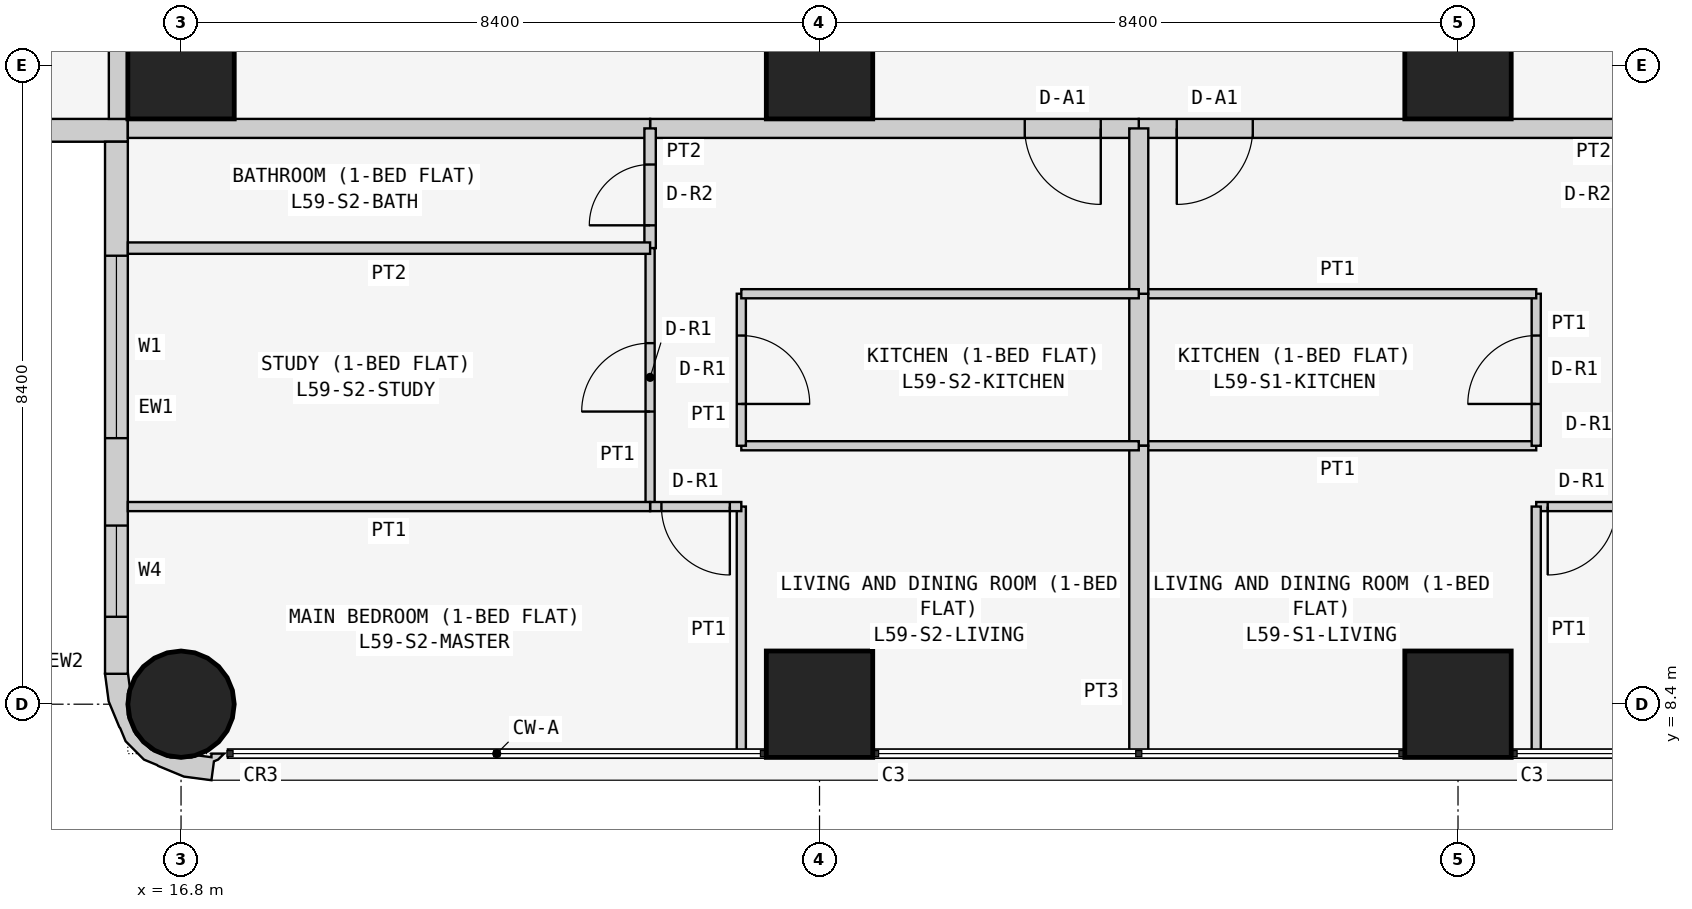
"""IFC4 building model, lengths in metres.
Left out: names, types, materials, properties, quantities, classifications, styles, units other than length and angle.
Written with IfcOpenShell. Run it as: python <this file> out.ifc"""

import sys

from ifc_helpers import new_model, si_unit, direction, frame, frame_2d, origin, origin_2d, place, context, subcontext, project, spatial, polyline, rectangle, circle, outline, extrude, element, fill, save


model = new_model("IFC4")
c1 = context("Model", 3, precision=1e-05, world=origin(), true_north=direction((0.0, 1.0)))
c2 = subcontext(c1, "Body", "Model", "MODEL_VIEW")
j1 = project(units=[si_unit("LENGTHUNIT", "METRE"), si_unit("PLANEANGLEUNIT", "RADIAN")], contexts=[c1])
p1 = place(None, origin())
s1 = spatial("IfcSite", under=j1, at=p1, CompositionType="ELEMENT")
p2 = place(p1, origin())
s2 = spatial("IfcBuilding", under=s1, at=p2, CompositionType="ELEMENT")
p3 = place(p2, frame((0.0, 0.0, 226.5)))
s3 = spatial("IfcBuildingStorey", under=s2, at=p3, CompositionType="ELEMENT", Elevation=226.5)
p4 = place(p3, frame((16.8, 8.4, 0.0), z_axis=(0.0, 0.0, 1.0), x_axis=(1.0, 0.0, 0.0)))
e1 = element("IfcColumn", 1, at=p4, inside=s3, PredefinedType="COLUMN", context=c2, shape_type="SweptSolid", body=[
    extrude(circle(Radius=0.7, at=origin_2d()), origin(), (0.0, 0.0, 1.0), 3.6),
])
for number, where, z_axis, x_axis in (
    (2, (16.8, 16.8, 0.0), (0.0, 0.0, 1.0), (1.0, 0.0, 0.0)),
    (3, (25.2, 8.4, 0.0), (0.0, 0.0, 1.0), (1.0, 0.0, 0.0)),
    (4, (25.2, 16.8, 0.0), (0.0, 0.0, 1.0), (1.0, 0.0, 0.0)),
    (5, (33.6, 8.4, 0.0), (0.0, 0.0, 1.0), (1.0, 0.0, 0.0)),
    (6, (33.6, 16.8, 0.0), (0.0, 0.0, 1.0), (1.0, 0.0, 0.0)),
):
    element("IfcColumn", number, at=place(p3, frame(where, z_axis=z_axis, x_axis=x_axis)), inside=s3, PredefinedType="COLUMN", context=c2, shape_type="SweptSolid", body=[
        extrude(rectangle(XDim=1.4, YDim=1.4, at=origin_2d()), origin(), (0.0, 0.0, 1.0), 3.6),
    ])
p5 = place(p3, frame((0.4, 15.95, 0.0), z_axis=(0.0, 0.0, 1.0), x_axis=(1.0, 0.0, 0.0)))
e7 = element("IfcWall", 7, at=p5, inside=s3, PredefinedType="SOLIDWALL", context=c2, shape_type="SweptSolid", body=[
    extrude(rectangle(XDim=15.7, YDim=0.3, at=frame_2d((7.85, 0.0))), origin(), (0.0, 0.0, 1.0), 3.45),
])
p6 = place(p5, frame((12.4, 0.0, 0.9)))
e8 = element("IfcOpeningElement", 8, at=p6, cuts=e7, PredefinedType="OPENING", context=c2, shape_type="SweptSolid", body=[
    extrude(rectangle(XDim=1.8, YDim=1.5, at=frame_2d((0.9, 0.75))), frame((0.0, 0.16, 0.0), z_axis=(0.0, -1.0, 0.0), x_axis=(1.0, 0.0, 0.0)), (0.0, 0.0, 1.0), 0.32),
])
p7 = place(p5, frame((9.55, 0.0, 1.5)))
e9 = element("IfcOpeningElement", 9, at=p7, cuts=e7, PredefinedType="OPENING", context=c2, shape_type="SweptSolid", body=[
    extrude(rectangle(XDim=0.9, YDim=0.7, at=frame_2d((0.45, 0.35))), frame((0.0, 0.16, 0.0), z_axis=(0.0, -1.0, 0.0), x_axis=(1.0, 0.0, 0.0)), (0.0, 0.0, 1.0), 0.32),
])
p8 = place(p5, frame((5.1, 0.0, 0.9)))
e10 = element("IfcOpeningElement", 10, at=p8, cuts=e7, PredefinedType="OPENING", context=c2, shape_type="SweptSolid", body=[
    extrude(rectangle(XDim=1.8, YDim=1.5, at=frame_2d((0.9, 0.75))), frame((0.0, 0.16, 0.0), z_axis=(0.0, -1.0, 0.0), x_axis=(1.0, 0.0, 0.0)), (0.0, 0.0, 1.0), 0.32),
])
p9 = place(p5, frame((2.0, 0.0, 0.0)))
e11 = element("IfcOpeningElement", 11, at=p9, cuts=e7, PredefinedType="OPENING", context=c2, shape_type="SweptSolid", body=[
    extrude(rectangle(XDim=0.9, YDim=2.4, at=frame_2d((0.45, 1.2))), frame((0.0, 0.16, 0.0), z_axis=(0.0, -1.0, 0.0), x_axis=(1.0, 0.0, 0.0)), (0.0, 0.0, 1.0), 0.32),
])
p10 = place(p5, frame((0.7, 0.0, 0.9)))
e12 = element("IfcOpeningElement", 12, at=p10, cuts=e7, PredefinedType="OPENING", context=c2, shape_type="SweptSolid", body=[
    extrude(rectangle(XDim=1.2, YDim=1.5, at=frame_2d((0.6, 0.75))), frame((0.0, 0.16, 0.0), z_axis=(0.0, -1.0, 0.0), x_axis=(1.0, 0.0, 0.0)), (0.0, 0.0, 1.0), 0.32),
])
p11 = place(p3, frame((15.95, 15.8, 0.0), z_axis=(0.0, 0.0, 1.0), x_axis=(0.0, -1.0, 0.0)))
e13 = element("IfcWall", 13, at=p11, inside=s3, PredefinedType="SOLIDWALL", context=c2, shape_type="SweptSolid", body=[
    extrude(rectangle(XDim=7.0, YDim=0.3, at=frame_2d((3.5, 0.0))), origin(), (0.0, 0.0, 1.0), 3.45),
])
p12 = place(p11, frame((1.5, 0.0, 0.9)))
e14 = element("IfcOpeningElement", 14, at=p12, cuts=e13, PredefinedType="OPENING", context=c2, shape_type="SweptSolid", body=[
    extrude(rectangle(XDim=2.4, YDim=1.5, at=frame_2d((1.2, 0.75))), frame((0.0, 0.16, 0.0), z_axis=(0.0, -1.0, 0.0), x_axis=(1.0, 0.0, 0.0)), (0.0, 0.0, 1.0), 0.32),
])
p13 = place(p11, frame((5.05, 0.0, 0.9)))
e15 = element("IfcOpeningElement", 15, at=p13, cuts=e13, PredefinedType="OPENING", context=c2, shape_type="SweptSolid", body=[
    extrude(rectangle(XDim=1.2, YDim=1.5, at=frame_2d((0.6, 0.75))), frame((0.0, 0.16, 0.0), z_axis=(0.0, -1.0, 0.0), x_axis=(1.0, 0.0, 0.0)), (0.0, 0.0, 1.0), 0.32),
])
p14 = place(p3, frame((16.076, 8.69, 0.0), z_axis=(0.0, 0.0, 1.0), x_axis=(-0.439933741929, -0.898030234854, 0.0)))
e16 = element("IfcWall", 16, at=p14, inside=s3, PredefinedType="SOLIDWALL", context=c2, shape_type="SweptSolid", body=[
    extrude(outline(polyline([(0.664, 1.577), (0.426, 1.497), (0.382, 1.536), (0.276, 1.572), (0.349, 1.423), (0.392, 1.444), (0.453, 1.261), (0.51, 1.211), (0.632, 0.961), (0.65, 0.683), (0.56, 0.419), (0.375, 0.21), (0.125, 0.087), (0.05, 0.082), (-0.127, -0.035), (-0.145, -0.044), (0.022, -0.296), (0.327, -0.094), (0.568, 0.18), (0.578, 0.199), (0.7, 0.337), (0.811, 0.661), (0.799, 0.846), (0.803, 0.866), (0.78, 1.231), (0.664, 1.577)])), origin(), (0.0, 0.0, 1.0), 3.45),
])
p15 = place(p3, frame((35.829, 15.975, 0.0), z_axis=(0.0, 0.0, 1.0), x_axis=(-1.0, 0.0, 0.0)))
e17 = element("IfcWall", 17, at=p15, inside=s3, PredefinedType="PARTITIONING", context=c2, shape_type="SweptSolid", body=[
    extrude(rectangle(XDim=6.429, YDim=0.25, at=frame_2d((3.215, 0.0))), origin(), (0.0, 0.0, 1.0), 3.45),
])
p16 = place(p15, frame((4.929, 0.0, 0.0)))
e18 = element("IfcOpeningElement", 18, at=p16, cuts=e17, PredefinedType="OPENING", context=c2, shape_type="SweptSolid", body=[
    extrude(rectangle(XDim=1.0, YDim=2.1, at=frame_2d((0.5, 1.05))), frame((0.0, 0.135, 0.0), z_axis=(0.0, -1.0, 0.0), x_axis=(1.0, 0.0, 0.0)), (0.0, 0.0, 1.0), 0.27),
])
p17 = place(p3, frame((29.4, 15.975, 0.0), z_axis=(0.0, 0.0, 1.0), x_axis=(-1.0, 0.0, 0.0)))
e19 = element("IfcWall", 19, at=p17, inside=s3, PredefinedType="PARTITIONING", context=c2, shape_type="SweptSolid", body=[
    extrude(rectangle(XDim=6.429, YDim=0.25, at=frame_2d((3.214, 0.0))), origin(), (0.0, 0.0, 1.0), 3.45),
])
p18 = place(p17, frame((0.5, 0.0, 0.0)))
e20 = element("IfcOpeningElement", 20, at=p18, cuts=e19, PredefinedType="OPENING", context=c2, shape_type="SweptSolid", body=[
    extrude(rectangle(XDim=1.0, YDim=2.1, at=frame_2d((0.5, 1.05))), frame((0.0, 0.135, 0.0), z_axis=(0.0, -1.0, 0.0), x_axis=(1.0, 0.0, 0.0)), (0.0, 0.0, 1.0), 0.27),
])
for number, where, z_axis, x_axis in (
    (21, (22.971, 15.975, 0.0), (0.0, 0.0, 1.0), (-1.0, 0.0, 0.0)),
    (22, (15.975, 16.1, 0.0), (0.0, 0.0, 1.0), (0.0, 1.0, 0.0)),
):
    element("IfcWall", number, at=place(p3, frame(where, z_axis=z_axis, x_axis=x_axis)), inside=s3, PredefinedType="PARTITIONING", context=c2, shape_type="SweptSolid", body=[
        extrude(rectangle(XDim=6.871, YDim=0.25, at=frame_2d((3.436, 0.0))), origin(), (0.0, 0.0, 1.0), 3.45),
    ])
p19 = place(p3, frame((29.4, 11.8, 0.0), z_axis=(0.0, 0.0, 1.0), x_axis=(1.0, 0.0, 0.0)))
e23 = element("IfcWall", 23, at=p19, inside=s3, PredefinedType="PARTITIONING", context=c2, shape_type="SweptSolid", body=[
    extrude(rectangle(XDim=5.229, YDim=0.12, at=frame_2d((2.615, 0.0))), origin(), (0.0, 0.0, 1.0), 3.45),
])
p20 = place(p3, frame((34.629, 11.8, 0.0), z_axis=(0.0, 0.0, 1.0), x_axis=(0.0, 1.0, 0.0)))
e24 = element("IfcWall", 24, at=p20, inside=s3, PredefinedType="PARTITIONING", context=c2, shape_type="SweptSolid", body=[
    extrude(rectangle(XDim=2.0, YDim=0.12, at=frame_2d((1.0, 0.0))), origin(), (0.0, 0.0, 1.0), 3.45),
])
p21 = place(p20, frame((0.55, 0.0, 0.0)))
e25 = element("IfcOpeningElement", 25, at=p21, cuts=e24, PredefinedType="OPENING", context=c2, shape_type="SweptSolid", body=[
    extrude(rectangle(XDim=0.9, YDim=2.1, at=frame_2d((0.45, 1.05))), frame((0.0, 0.07, 0.0), z_axis=(0.0, -1.0, 0.0), x_axis=(1.0, 0.0, 0.0)), (0.0, 0.0, 1.0), 0.14),
])
p22 = place(p3, frame((34.629, 13.8, 0.0), z_axis=(0.0, 0.0, 1.0), x_axis=(-1.0, 0.0, 0.0)))
e26 = element("IfcWall", 26, at=p22, inside=s3, PredefinedType="PARTITIONING", context=c2, shape_type="SweptSolid", body=[
    extrude(rectangle(XDim=5.229, YDim=0.12, at=frame_2d((2.615, 0.0))), origin(), (0.0, 0.0, 1.0), 3.45),
])
p23 = place(p3, frame((29.4, 13.8, 0.0), z_axis=(0.0, 0.0, 1.0), x_axis=(0.0, -1.0, 0.0)))
e27 = element("IfcWall", 27, at=p23, inside=s3, PredefinedType="PARTITIONING", context=c2, shape_type="SweptSolid", body=[
    extrude(rectangle(XDim=2.0, YDim=0.25, at=frame_2d((1.0, 0.0))), origin(), (0.0, 0.0, 1.0), 2.848),
])
p24 = place(p3, frame((35.829, 11.0, 0.0), z_axis=(0.0, 0.0, 1.0), x_axis=(-1.0, 0.0, 0.0)))
e28 = element("IfcWall", 28, at=p24, inside=s3, PredefinedType="PARTITIONING", context=c2, shape_type="SweptSolid", body=[
    extrude(rectangle(XDim=1.2, YDim=0.12, at=frame_2d((0.6, 0.0))), origin(), (0.0, 0.0, 1.0), 3.45),
])
p25 = place(p24, frame((0.149, 0.0, 0.0)))
e29 = element("IfcOpeningElement", 29, at=p25, cuts=e28, PredefinedType="OPENING", context=c2, shape_type="SweptSolid", body=[
    extrude(rectangle(XDim=0.9, YDim=2.1, at=frame_2d((0.45, 1.05))), frame((0.0, 0.07, 0.0), z_axis=(0.0, -1.0, 0.0), x_axis=(1.0, 0.0, 0.0)), (0.0, 0.0, 1.0), 0.14),
])
p26 = place(p3, frame((34.629, 11.0, 0.0), z_axis=(0.0, 0.0, 1.0), x_axis=(0.0, -1.0, 0.0)))
e30 = element("IfcWall", 30, at=p26, inside=s3, PredefinedType="PARTITIONING", context=c2, shape_type="SweptSolid", body=[
    extrude(rectangle(XDim=3.25, YDim=0.12, at=frame_2d((1.625, 0.0))), origin(), (0.0, 0.0, 1.0), 3.45),
])
p27 = place(p3, frame((29.4, 7.75, 0.0), z_axis=(0.0, 0.0, 1.0), x_axis=(0.0, 1.0, 0.0)))
e31 = element("IfcWall", 31, at=p27, inside=s3, PredefinedType="PARTITIONING", context=c2, shape_type="SweptSolid", body=[
    extrude(rectangle(XDim=4.05, YDim=0.25, at=frame_2d((2.025, 0.0))), origin(), (0.0, 0.0, 1.0), 2.848),
])
p28 = place(p3, frame((29.4, 13.8, 0.0), z_axis=(0.0, 0.0, 1.0), x_axis=(0.0, 1.0, 0.0)))
e32 = element("IfcWall", 32, at=p28, inside=s3, PredefinedType="PARTITIONING", context=c2, shape_type="SweptSolid", body=[
    extrude(rectangle(XDim=2.175, YDim=0.25, at=frame_2d((1.087, 0.0))), origin(), (0.0, 0.0, 1.0), 2.848),
])
p29 = place(p3, frame((29.4, 11.8, 0.0), z_axis=(0.0, 0.0, 1.0), x_axis=(-1.0, 0.0, 0.0)))
e33 = element("IfcWall", 33, at=p29, inside=s3, PredefinedType="PARTITIONING", context=c2, shape_type="SweptSolid", body=[
    extrude(rectangle(XDim=5.229, YDim=0.12, at=frame_2d((2.615, 0.0))), origin(), (0.0, 0.0, 1.0), 3.45),
])
p30 = place(p3, frame((24.171, 11.8, 0.0), z_axis=(0.0, 0.0, 1.0), x_axis=(0.0, 1.0, 0.0)))
e34 = element("IfcWall", 34, at=p30, inside=s3, PredefinedType="PARTITIONING", context=c2, shape_type="SweptSolid", body=[
    extrude(rectangle(XDim=2.0, YDim=0.12, at=frame_2d((1.0, 0.0))), origin(), (0.0, 0.0, 1.0), 3.45),
])
p31 = place(p30, frame((0.55, 0.0, 0.0)))
e35 = element("IfcOpeningElement", 35, at=p31, cuts=e34, PredefinedType="OPENING", context=c2, shape_type="SweptSolid", body=[
    extrude(rectangle(XDim=0.9, YDim=2.1, at=frame_2d((0.45, 1.05))), frame((0.0, 0.07, 0.0), z_axis=(0.0, -1.0, 0.0), x_axis=(1.0, 0.0, 0.0)), (0.0, 0.0, 1.0), 0.14),
])
p32 = place(p3, frame((24.171, 13.8, 0.0), z_axis=(0.0, 0.0, 1.0), x_axis=(1.0, 0.0, 0.0)))
e36 = element("IfcWall", 36, at=p32, inside=s3, PredefinedType="PARTITIONING", context=c2, shape_type="SweptSolid", body=[
    extrude(rectangle(XDim=5.229, YDim=0.12, at=frame_2d((2.615, 0.0))), origin(), (0.0, 0.0, 1.0), 3.45),
])
p33 = place(p3, frame((22.971, 14.4, 0.0), z_axis=(0.0, 0.0, 1.0), x_axis=(0.0, 1.0, 0.0)))
e37 = element("IfcWall", 37, at=p33, inside=s3, PredefinedType="PARTITIONING", context=c2, shape_type="SweptSolid", body=[
    extrude(rectangle(XDim=1.575, YDim=0.15, at=frame_2d((0.788, 0.0))), origin(), (0.0, 0.0, 1.0), 3.45),
])
p34 = place(p33, frame((0.3, 0.0, 0.0)))
e38 = element("IfcOpeningElement", 38, at=p34, cuts=e37, PredefinedType="OPENING", context=c2, shape_type="SweptSolid", body=[
    extrude(rectangle(XDim=0.8, YDim=2.1, at=frame_2d((0.4, 1.05))), frame((0.0, 0.085, 0.0), z_axis=(0.0, -1.0, 0.0), x_axis=(1.0, 0.0, 0.0)), (0.0, 0.0, 1.0), 0.17),
])
p35 = place(p3, frame((22.971, 11.0, 0.0), z_axis=(0.0, 0.0, 1.0), x_axis=(0.0, 1.0, 0.0)))
e39 = element("IfcWall", 39, at=p35, inside=s3, PredefinedType="PARTITIONING", context=c2, shape_type="SweptSolid", body=[
    extrude(rectangle(XDim=3.4, YDim=0.12, at=frame_2d((1.7, 0.0))), origin(), (0.0, 0.0, 1.0), 3.45),
])
p36 = place(p35, frame((1.25, 0.0, 0.0)))
e40 = element("IfcOpeningElement", 40, at=p36, cuts=e39, PredefinedType="OPENING", context=c2, shape_type="SweptSolid", body=[
    extrude(rectangle(XDim=0.9, YDim=2.1, at=frame_2d((0.45, 1.05))), frame((0.0, 0.07, 0.0), z_axis=(0.0, -1.0, 0.0), x_axis=(1.0, 0.0, 0.0)), (0.0, 0.0, 1.0), 0.14),
])
p37 = place(p3, frame((24.171, 7.75, 0.0), z_axis=(0.0, 0.0, 1.0), x_axis=(0.0, 1.0, 0.0)))
e41 = element("IfcWall", 41, at=p37, inside=s3, PredefinedType="PARTITIONING", context=c2, shape_type="SweptSolid", body=[
    extrude(rectangle(XDim=3.25, YDim=0.12, at=frame_2d((1.625, 0.0))), origin(), (0.0, 0.0, 1.0), 3.45),
])
p38 = place(p3, frame((24.171, 11.0, 0.0), z_axis=(0.0, 0.0, 1.0), x_axis=(-1.0, 0.0, 0.0)))
e42 = element("IfcWall", 42, at=p38, inside=s3, PredefinedType="PARTITIONING", context=c2, shape_type="SweptSolid", body=[
    extrude(rectangle(XDim=1.2, YDim=0.12, at=frame_2d((0.6, 0.0))), origin(), (0.0, 0.0, 1.0), 3.45),
])
p39 = place(p38, frame((0.151, 0.0, 0.0)))
e43 = element("IfcOpeningElement", 43, at=p39, cuts=e42, PredefinedType="OPENING", context=c2, shape_type="SweptSolid", body=[
    extrude(rectangle(XDim=0.9, YDim=2.1, at=frame_2d((0.45, 1.05))), frame((0.0, 0.07, 0.0), z_axis=(0.0, -1.0, 0.0), x_axis=(1.0, 0.0, 0.0)), (0.0, 0.0, 1.0), 0.14),
])
p40 = place(p3, frame((22.971, 14.4, 0.0), z_axis=(0.0, 0.0, 1.0), x_axis=(-1.0, 0.0, 0.0)))
e44 = element("IfcWall", 44, at=p40, inside=s3, PredefinedType="PARTITIONING", context=c2, shape_type="SweptSolid", body=[
    extrude(rectangle(XDim=6.871, YDim=0.15, at=frame_2d((3.436, 0.0))), origin(), (0.0, 0.0, 1.0), 3.45),
])
p41 = place(p3, frame((22.971, 11.0, 0.0), z_axis=(0.0, 0.0, 1.0), x_axis=(-1.0, 0.0, 0.0)))
e45 = element("IfcWall", 45, at=p41, inside=s3, PredefinedType="PARTITIONING", context=c2, shape_type="SweptSolid", body=[
    extrude(rectangle(XDim=6.871, YDim=0.12, at=frame_2d((3.436, 0.0))), origin(), (0.0, 0.0, 1.0), 3.45),
])
p42 = place(p12, origin())
e46 = element("IfcWindow", 46, at=p42, inside=s3, PartitioningType="SINGLE_PANEL", PredefinedType="WINDOW", context=c2, shape_type="SweptSolid", body=[
    extrude(rectangle(XDim=2.4, YDim=1.5, at=frame_2d((1.2, 0.75))), frame((0.0, 0.03, 0.0), z_axis=(0.0, -1.0, 0.0), x_axis=(1.0, 0.0, 0.0)), (0.0, 0.0, 1.0), 0.06),
])
fill(e14, e46)
p43 = place(p13, origin())
e47 = element("IfcWindow", 47, at=p43, inside=s3, PartitioningType="SINGLE_PANEL", PredefinedType="WINDOW", context=c2, shape_type="SweptSolid", body=[
    extrude(rectangle(XDim=1.2, YDim=1.5, at=frame_2d((0.6, 0.75))), frame((0.0, 0.03, 0.0), z_axis=(0.0, -1.0, 0.0), x_axis=(1.0, 0.0, 0.0)), (0.0, 0.0, 1.0), 0.06),
])
fill(e15, e47)
p44 = place(p16, origin())
e48 = element("IfcDoor", 48, at=p44, inside=s3, OperationType="SINGLE_SWING_RIGHT", PredefinedType="DOOR", context=c2, shape_type="SweptSolid", body=[
    extrude(rectangle(XDim=1.0, YDim=2.1, at=frame_2d((0.5, 1.05))), frame((0.0, 0.025, 0.0), z_axis=(0.0, -1.0, 0.0), x_axis=(1.0, 0.0, 0.0)), (0.0, 0.0, 1.0), 0.05),
])
fill(e18, e48)
p45 = place(p21, origin())
e49 = element("IfcDoor", 49, at=p45, inside=s3, OperationType="SINGLE_SWING_LEFT", PredefinedType="DOOR", context=c2, shape_type="SweptSolid", body=[
    extrude(rectangle(XDim=0.9, YDim=2.1, at=frame_2d((0.45, 1.05))), frame((0.0, 0.025, 0.0), z_axis=(0.0, -1.0, 0.0), x_axis=(1.0, 0.0, 0.0)), (0.0, 0.0, 1.0), 0.05),
])
fill(e25, e49)
p46 = place(p25, origin())
e50 = element("IfcDoor", 50, at=p46, inside=s3, OperationType="SINGLE_SWING_RIGHT", PredefinedType="DOOR", context=c2, shape_type="SweptSolid", body=[
    extrude(rectangle(XDim=0.9, YDim=2.1, at=frame_2d((0.45, 1.05))), frame((0.0, 0.025, 0.0), z_axis=(0.0, -1.0, 0.0), x_axis=(1.0, 0.0, 0.0)), (0.0, 0.0, 1.0), 0.05),
])
fill(e29, e50)
p47 = place(p18, origin())
e51 = element("IfcDoor", 51, at=p47, inside=s3, OperationType="SINGLE_SWING_LEFT", PredefinedType="DOOR", context=c2, shape_type="SweptSolid", body=[
    extrude(rectangle(XDim=1.0, YDim=2.1, at=frame_2d((0.5, 1.05))), frame((0.0, 0.025, 0.0), z_axis=(0.0, -1.0, 0.0), x_axis=(1.0, 0.0, 0.0)), (0.0, 0.0, 1.0), 0.05),
])
fill(e20, e51)
p48 = place(p31, frame((0.9, 0.0, 0.0), z_axis=(0.0, 0.0, 1.0), x_axis=(-1.0, 0.0, 0.0)))
e52 = element("IfcDoor", 52, at=p48, inside=s3, OperationType="SINGLE_SWING_RIGHT", PredefinedType="DOOR", context=c2, shape_type="SweptSolid", body=[
    extrude(rectangle(XDim=0.9, YDim=2.1, at=frame_2d((0.45, 1.05))), frame((0.0, 0.025, 0.0), z_axis=(0.0, -1.0, 0.0), x_axis=(1.0, 0.0, 0.0)), (0.0, 0.0, 1.0), 0.05),
])
fill(e35, e52)
p49 = place(p34, origin())
e53 = element("IfcDoor", 53, at=p49, inside=s3, OperationType="SINGLE_SWING_LEFT", PredefinedType="DOOR", context=c2, shape_type="SweptSolid", body=[
    extrude(rectangle(XDim=0.8, YDim=2.1, at=frame_2d((0.4, 1.05))), frame((0.0, 0.025, 0.0), z_axis=(0.0, -1.0, 0.0), x_axis=(1.0, 0.0, 0.0)), (0.0, 0.0, 1.0), 0.05),
])
fill(e38, e53)
p50 = place(p36, origin())
e54 = element("IfcDoor", 54, at=p50, inside=s3, OperationType="SINGLE_SWING_LEFT", PredefinedType="DOOR", context=c2, shape_type="SweptSolid", body=[
    extrude(rectangle(XDim=0.9, YDim=2.1, at=frame_2d((0.45, 1.05))), frame((0.0, 0.025, 0.0), z_axis=(0.0, -1.0, 0.0), x_axis=(1.0, 0.0, 0.0)), (0.0, 0.0, 1.0), 0.05),
])
fill(e40, e54)
p51 = place(p39, origin())
e55 = element("IfcDoor", 55, at=p51, inside=s3, OperationType="SINGLE_SWING_LEFT", PredefinedType="DOOR", context=c2, shape_type="SweptSolid", body=[
    extrude(rectangle(XDim=0.9, YDim=2.1, at=frame_2d((0.45, 1.05))), frame((0.0, 0.025, 0.0), z_axis=(0.0, -1.0, 0.0), x_axis=(1.0, 0.0, 0.0)), (0.0, 0.0, 1.0), 0.05),
])
fill(e43, e55)
save(model, sys.argv[1])
